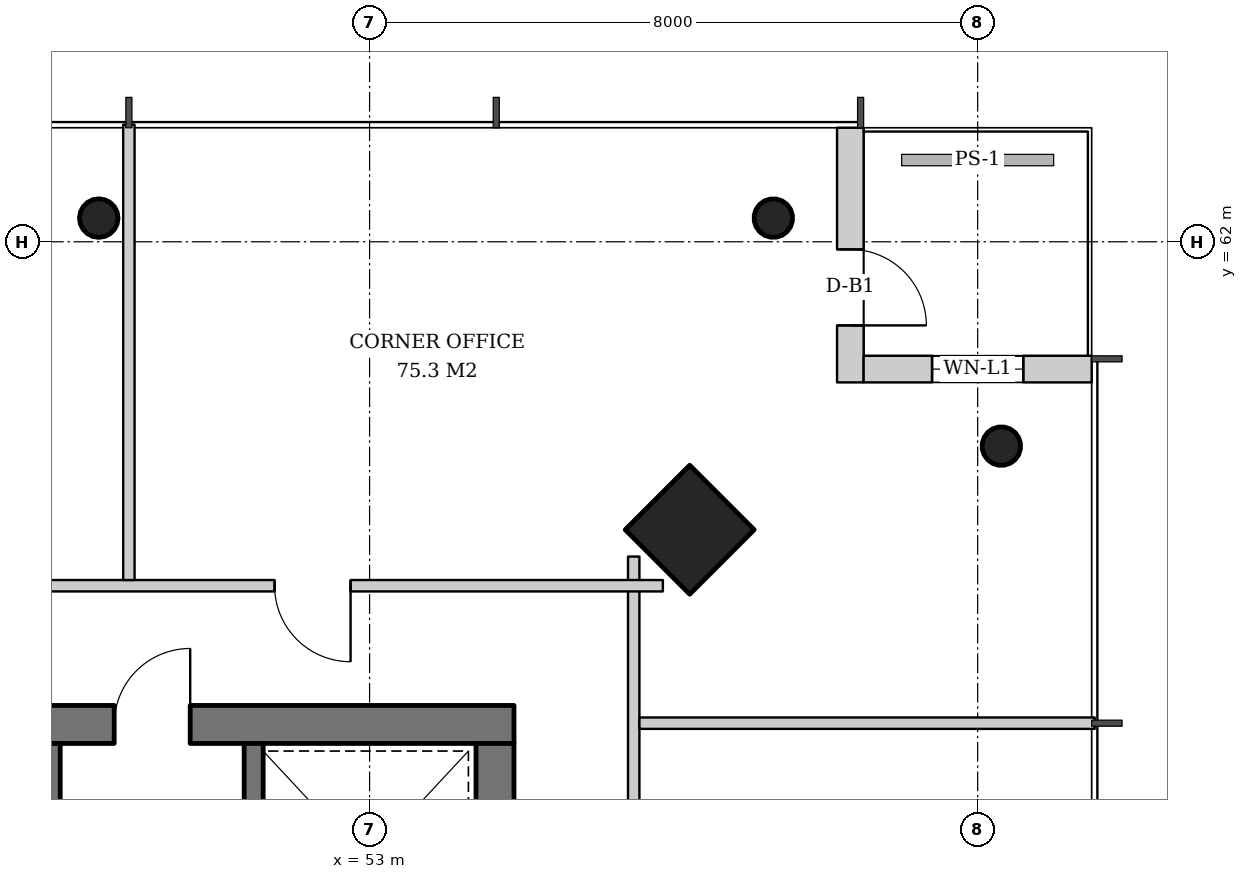
"""IFC4 building model, lengths in metres.
Left out: names, types, materials, properties, quantities, classifications, styles, units other than length and angle.
Written with IfcOpenShell. Run it as: python <this file> out.ifc"""

import sys

from ifc_helpers import new_model, si_unit, direction, frame, frame_2d, origin, origin_2d, place, context, subcontext, project, spatial, rectangle, hollow_circle, extrude, element, fill, save


model = new_model("IFC4")
c1 = context("Model", 3, precision=1e-05, world=origin(), true_north=direction((0.0, 1.0)))
c2 = subcontext(c1, "Body", "Model", "MODEL_VIEW")
j1 = project(units=[si_unit("LENGTHUNIT", "METRE"), si_unit("PLANEANGLEUNIT", "RADIAN")], contexts=[c1])
p1 = place(None, origin())
s1 = spatial("IfcSite", under=j1, at=p1, CompositionType="ELEMENT")
p2 = place(p1, origin())
s2 = spatial("IfcBuilding", under=s1, at=p2, CompositionType="ELEMENT")
p3 = place(p2, frame((0.0, 0.0, 260.4)))
s3 = spatial("IfcBuildingStorey", under=s2, at=p3, CompositionType="ELEMENT", Elevation=260.4)
p4 = place(p3, frame((57.25, 58.25, 0.0), z_axis=(-0.031898107953, -0.031898107953, 0.998981992539), x_axis=(0.707106781187, -0.707106781187, 0.0)))
e1 = element("IfcColumn", 1, at=p4, inside=s3, PredefinedType="COLUMN", context=c2, shape_type="SweptSolid", body=[
    extrude(rectangle(XDim=1.2, YDim=1.2, at=origin_2d()), origin(), (0.0, 0.0, 1.0), 3.804),
])
for number, where, z_axis, x_axis in (
    (2, (61.35, 59.35, 0.0), (-0.032, -0.032, 0.999), (0.707, -0.707, 0.0)),
    (3, (58.35, 62.35, 0.0), (-0.032, -0.032, 0.999), (0.707, -0.707, 0.0)),
):
    element("IfcColumn", number, at=place(p3, frame(where, z_axis=z_axis, x_axis=x_axis)), inside=s3, PredefinedType="COLUMN", context=c2, shape_type="SweptSolid", body=[
        extrude(hollow_circle(Radius=0.254, WallThickness=0.02, at=origin_2d()), origin(), (0.0, 0.0, 1.0), 3.804),
    ])
p5 = place(p3, frame((49.45, 62.35, 0.0), z_axis=(-0.010658893366, -0.031976680097, 0.999431778523), x_axis=(0.948683298051, -0.316227766017, 0.0)))
e4 = element("IfcColumn", 4, at=p5, inside=s3, PredefinedType="COLUMN", context=c2, shape_type="SweptSolid", body=[
    extrude(hollow_circle(Radius=0.254, WallThickness=0.02, at=origin_2d()), origin(), (0.0, 0.0, 1.0), 3.802),
])
p6 = place(p3, frame((35.1, 55.65, 0.0), z_axis=(0.0, 0.0, 1.0), x_axis=(1.0, 0.0, 0.0)))
e5 = element("IfcWall", 5, at=p6, inside=s3, PredefinedType="SHEAR", context=c2, shape_type="SweptSolid", body=[
    extrude(rectangle(XDim=19.8, YDim=0.5, at=frame_2d((9.9, 0.0))), origin(), (0.0, 0.0, 1.0), 3.8),
])
p7 = place(p6, frame((14.54, 0.0, 0.0)))
e6 = element("IfcOpeningElement", 6, at=p7, cuts=e5, PredefinedType="OPENING", context=c2, shape_type="SweptSolid", body=[
    extrude(rectangle(XDim=1.0, YDim=2.1, at=frame_2d((0.5, 1.05))), frame((0.0, 0.26, 0.0), z_axis=(0.0, -1.0, 0.0), x_axis=(1.0, 0.0, 0.0)), (0.0, 0.0, 1.0), 0.52),
])
p8 = place(p6, frame((1.34, 0.0, 0.0)))
e7 = element("IfcOpeningElement", 7, at=p8, cuts=e5, PredefinedType="OPENING", context=c2, shape_type="SweptSolid", body=[
    extrude(rectangle(XDim=1.0, YDim=2.1, at=frame_2d((0.5, 1.05))), frame((0.0, 0.26, 0.0), z_axis=(0.0, -1.0, 0.0), x_axis=(1.0, 0.0, 0.0)), (0.0, 0.0, 1.0), 0.52),
])
p9 = place(p6, frame((3.42, 0.0, 0.0)))
e8 = element("IfcOpeningElement", 8, at=p9, cuts=e5, PredefinedType="OPENING", context=c2, shape_type="SweptSolid", body=[
    extrude(rectangle(XDim=1.0, YDim=2.1, at=frame_2d((0.5, 1.05))), frame((0.0, 0.26, 0.0), z_axis=(0.0, -1.0, 0.0), x_axis=(1.0, 0.0, 0.0)), (0.0, 0.0, 1.0), 0.52),
])
p10 = place(p3, frame((54.65, 36.6, 0.0), z_axis=(0.0, 0.0, 1.0), x_axis=(0.0, 1.0, 0.0)))
e9 = element("IfcWall", 9, at=p10, inside=s3, PredefinedType="SHEAR", context=c2, shape_type="SweptSolid", body=[
    extrude(rectangle(XDim=18.8, YDim=0.5, at=frame_2d((9.4, 0.0))), origin(), (0.0, 0.0, 1.0), 3.8),
])
p11 = place(p10, frame((8.5, 0.0, 0.0)))
e10 = element("IfcOpeningElement", 10, at=p11, cuts=e9, PredefinedType="OPENING", context=c2, shape_type="SweptSolid", body=[
    extrude(rectangle(XDim=1.8, YDim=2.4, at=frame_2d((0.9, 1.2))), frame((0.0, 0.26, 0.0), z_axis=(0.0, -1.0, 0.0), x_axis=(1.0, 0.0, 0.0)), (0.0, 0.0, 1.0), 0.52),
])
p12 = place(p3, frame((48.73, 52.4, 0.0), z_axis=(0.0, 0.0, 1.0), x_axis=(0.0, 1.0, 0.0)))
e11 = element("IfcWall", 11, at=p12, inside=s3, PredefinedType="SHEAR", context=c2, shape_type="SweptSolid", body=[
    extrude(rectangle(XDim=3.0, YDim=0.4, at=frame_2d((1.5, 0.0))), origin(), (0.0, 0.0, 1.0), 3.8),
])
p13 = place(p12, frame((0.3, 0.0, 0.0)))
e12 = element("IfcOpeningElement", 12, at=p13, cuts=e11, PredefinedType="OPENING", context=c2, shape_type="SweptSolid", body=[
    extrude(rectangle(XDim=1.0, YDim=2.1, at=frame_2d((0.5, 1.05))), frame((0.0, 0.21, 0.0), z_axis=(0.0, -1.0, 0.0), x_axis=(1.0, 0.0, 0.0)), (0.0, 0.0, 1.0), 0.42),
])
p14 = place(p3, frame((59.325, 63.5, 0.0), z_axis=(0.0, 0.0, 1.0), x_axis=(0.0, -1.0, 0.0)))
e13 = element("IfcWall", 13, at=p14, inside=s3, PredefinedType="SOLIDWALL", context=c2, shape_type="SweptSolid", body=[
    extrude(rectangle(XDim=3.35, YDim=0.35, at=frame_2d((1.675, 0.0))), origin(), (0.0, 0.0, 1.0), 3.62),
])
p15 = place(p14, frame((1.6, 0.0, 0.0)))
e14 = element("IfcOpeningElement", 14, at=p15, cuts=e13, PredefinedType="OPENING", context=c2, shape_type="SweptSolid", body=[
    extrude(rectangle(XDim=1.0, YDim=2.4, at=frame_2d((0.5, 1.2))), frame((0.0, 0.185, 0.0), z_axis=(0.0, -1.0, 0.0), x_axis=(1.0, 0.0, 0.0)), (0.0, 0.0, 1.0), 0.37),
])
p16 = place(p3, frame((59.5, 60.325, 0.0), z_axis=(0.0, 0.0, 1.0), x_axis=(1.0, 0.0, 0.0)))
e15 = element("IfcWall", 15, at=p16, inside=s3, PredefinedType="SOLIDWALL", context=c2, shape_type="SweptSolid", body=[
    extrude(rectangle(XDim=3.0, YDim=0.35, at=frame_2d((1.5, 0.0))), origin(), (0.0, 0.0, 1.0), 3.62),
])
p17 = place(p16, frame((0.9, 0.0, 0.6)))
e16 = element("IfcOpeningElement", 16, at=p17, cuts=e15, PredefinedType="OPENING", context=c2, shape_type="SweptSolid", body=[
    extrude(rectangle(XDim=1.2, YDim=2.55, at=frame_2d((0.6, 1.275))), frame((0.0, 0.185, 0.0), z_axis=(0.0, -1.0, 0.0), x_axis=(1.0, 0.0, 0.0)), (0.0, 0.0, 1.0), 0.37),
])
p18 = place(p3, frame((51.475, 52.4, 0.0), z_axis=(0.0, 0.0, 1.0), x_axis=(0.0, 1.0, 0.0)))
e17 = element("IfcWall", 17, at=p18, inside=s3, PredefinedType="SHEAR", context=c2, shape_type="SweptSolid", body=[
    extrude(rectangle(XDim=3.0, YDim=0.25, at=frame_2d((1.5, 0.0))), origin(), (0.0, 0.0, 1.0), 3.8),
])
p19 = place(p18, frame((0.8, 0.0, 0.0)))
e18 = element("IfcOpeningElement", 18, at=p19, cuts=e17, PredefinedType="OPENING", context=c2, shape_type="SweptSolid", body=[
    extrude(rectangle(XDim=1.3, YDim=2.2, at=frame_2d((0.65, 1.1))), frame((0.0, 0.135, 0.0), z_axis=(0.0, -1.0, 0.0), x_axis=(1.0, 0.0, 0.0)), (0.0, 0.0, 1.0), 0.27),
])
p20 = place(p3, frame((56.475, 34.141, 0.0), z_axis=(0.0, 0.0, 1.0), x_axis=(0.0, 1.0, 0.0)))
e19 = element("IfcWall", 19, at=p20, inside=s3, PredefinedType="PARTITIONING", context=c2, shape_type="SweptSolid", body=[
    extrude(rectangle(XDim=23.717, YDim=0.15, at=frame_2d((11.859, 0.0))), origin(), (0.0, 0.0, 1.0), 3.02),
])
p21 = place(p20, frame((4.109, 0.0, 0.0)))
e20 = element("IfcOpeningElement", 20, at=p21, cuts=e19, PredefinedType="OPENING", context=c2, shape_type="SweptSolid", body=[
    extrude(rectangle(XDim=1.0, YDim=2.1, at=frame_2d((0.5, 1.05))), frame((0.0, 0.085, 0.0), z_axis=(0.0, -1.0, 0.0), x_axis=(1.0, 0.0, 0.0)), (0.0, 0.0, 1.0), 0.17),
])
p22 = place(p20, frame((8.942, 0.0, 0.0)))
e21 = element("IfcOpeningElement", 21, at=p22, cuts=e19, PredefinedType="OPENING", context=c2, shape_type="SweptSolid", body=[
    extrude(rectangle(XDim=1.0, YDim=2.1, at=frame_2d((0.5, 1.05))), frame((0.0, 0.085, 0.0), z_axis=(0.0, -1.0, 0.0), x_axis=(1.0, 0.0, 0.0)), (0.0, 0.0, 1.0), 0.17),
])
p23 = place(p20, frame((13.775, 0.0, 0.0)))
e22 = element("IfcOpeningElement", 22, at=p23, cuts=e19, PredefinedType="OPENING", context=c2, shape_type="SweptSolid", body=[
    extrude(rectangle(XDim=1.0, YDim=2.1, at=frame_2d((0.5, 1.05))), frame((0.0, 0.085, 0.0), z_axis=(0.0, -1.0, 0.0), x_axis=(1.0, 0.0, 0.0)), (0.0, 0.0, 1.0), 0.17),
])
p24 = place(p20, frame((18.609, 0.0, 0.0)))
e23 = element("IfcOpeningElement", 23, at=p24, cuts=e19, PredefinedType="OPENING", context=c2, shape_type="SweptSolid", body=[
    extrude(rectangle(XDim=1.0, YDim=2.1, at=frame_2d((0.5, 1.05))), frame((0.0, 0.085, 0.0), z_axis=(0.0, -1.0, 0.0), x_axis=(1.0, 0.0, 0.0)), (0.0, 0.0, 1.0), 0.17),
])
p25 = place(p3, frame((56.55, 55.667, 0.0), z_axis=(0.0, 0.0, 1.0), x_axis=(1.0, 0.0, 0.0)))
e24 = element("IfcWall", 24, at=p25, inside=s3, PredefinedType="PARTITIONING", context=c2, shape_type="SweptSolid", body=[
    extrude(rectangle(XDim=5.99, YDim=0.15, at=frame_2d((2.995, 0.0))), origin(), (0.0, 0.0, 1.0), 3.12),
])
p26 = place(p3, frame((56.859, 57.475, 0.0), z_axis=(0.0, 0.0, 1.0), x_axis=(-1.0, 0.0, 0.0)))
e25 = element("IfcWall", 25, at=p26, inside=s3, PredefinedType="PARTITIONING", context=c2, shape_type="SweptSolid", body=[
    extrude(rectangle(XDim=23.717, YDim=0.15, at=frame_2d((11.859, 0.0))), origin(), (0.0, 0.0, 1.0), 3.02),
])
p27 = place(p26, frame((4.109, 0.0, 0.0)))
e26 = element("IfcOpeningElement", 26, at=p27, cuts=e25, PredefinedType="OPENING", context=c2, shape_type="SweptSolid", body=[
    extrude(rectangle(XDim=1.0, YDim=2.1, at=frame_2d((0.5, 1.05))), frame((0.0, 0.085, 0.0), z_axis=(0.0, -1.0, 0.0), x_axis=(1.0, 0.0, 0.0)), (0.0, 0.0, 1.0), 0.17),
])
p28 = place(p26, frame((8.942, 0.0, 0.0)))
e27 = element("IfcOpeningElement", 27, at=p28, cuts=e25, PredefinedType="OPENING", context=c2, shape_type="SweptSolid", body=[
    extrude(rectangle(XDim=1.0, YDim=2.1, at=frame_2d((0.5, 1.05))), frame((0.0, 0.085, 0.0), z_axis=(0.0, -1.0, 0.0), x_axis=(1.0, 0.0, 0.0)), (0.0, 0.0, 1.0), 0.17),
])
p29 = place(p26, frame((18.609, 0.0, 0.0)))
e28 = element("IfcOpeningElement", 28, at=p29, cuts=e25, PredefinedType="OPENING", context=c2, shape_type="SweptSolid", body=[
    extrude(rectangle(XDim=1.0, YDim=2.1, at=frame_2d((0.5, 1.05))), frame((0.0, 0.085, 0.0), z_axis=(0.0, -1.0, 0.0), x_axis=(1.0, 0.0, 0.0)), (0.0, 0.0, 1.0), 0.17),
])
p30 = place(p3, frame((49.833, 57.55, 0.0), z_axis=(0.0, 0.0, 1.0), x_axis=(0.0, 1.0, 0.0)))
e29 = element("IfcWall", 29, at=p30, inside=s3, PredefinedType="PARTITIONING", context=c2, shape_type="SweptSolid", body=[
    extrude(rectangle(XDim=5.99, YDim=0.15, at=frame_2d((2.995, 0.0))), origin(), (0.0, 0.0, 1.0), 3.12),
])
p31 = place(p15, origin())
e30 = element("IfcDoor", 30, at=p31, inside=s3, OperationType="SINGLE_SWING_RIGHT", PredefinedType="DOOR", context=c2, shape_type="SweptSolid", body=[
    extrude(rectangle(XDim=1.0, YDim=2.4, at=frame_2d((0.5, 1.2))), frame((0.0, 0.025, 0.0), z_axis=(0.0, -1.0, 0.0), x_axis=(1.0, 0.0, 0.0)), (0.0, 0.0, 1.0), 0.05),
])
fill(e14, e30)
p32 = place(p17, origin())
e31 = element("IfcWindow", 31, at=p32, inside=s3, PartitioningType="SINGLE_PANEL", PredefinedType="WINDOW", context=c2, shape_type="SweptSolid", body=[
    extrude(rectangle(XDim=1.2, YDim=2.55, at=frame_2d((0.6, 1.275))), frame((0.0, 0.03, 0.0), z_axis=(0.0, -1.0, 0.0), x_axis=(1.0, 0.0, 0.0)), (0.0, 0.0, 1.0), 0.06),
])
fill(e16, e31)
p33 = place(p7, origin())
e32 = element("IfcDoor", 32, at=p33, inside=s3, OperationType="SINGLE_SWING_RIGHT", PredefinedType="DOOR", context=c2, shape_type="SweptSolid", body=[
    extrude(rectangle(XDim=1.0, YDim=2.1, at=frame_2d((0.5, 1.05))), frame((0.0, 0.025, 0.0), z_axis=(0.0, -1.0, 0.0), x_axis=(1.0, 0.0, 0.0)), (0.0, 0.0, 1.0), 0.05),
])
fill(e6, e32)
p34 = place(p27, origin())
e33 = element("IfcDoor", 33, at=p34, inside=s3, OperationType="SINGLE_SWING_LEFT", PredefinedType="DOOR", context=c2, shape_type="SweptSolid", body=[
    extrude(rectangle(XDim=1.0, YDim=2.1, at=frame_2d((0.5, 1.05))), frame((0.0, 0.025, 0.0), z_axis=(0.0, -1.0, 0.0), x_axis=(1.0, 0.0, 0.0)), (0.0, 0.0, 1.0), 0.05),
])
fill(e26, e33)
save(model, sys.argv[1])
